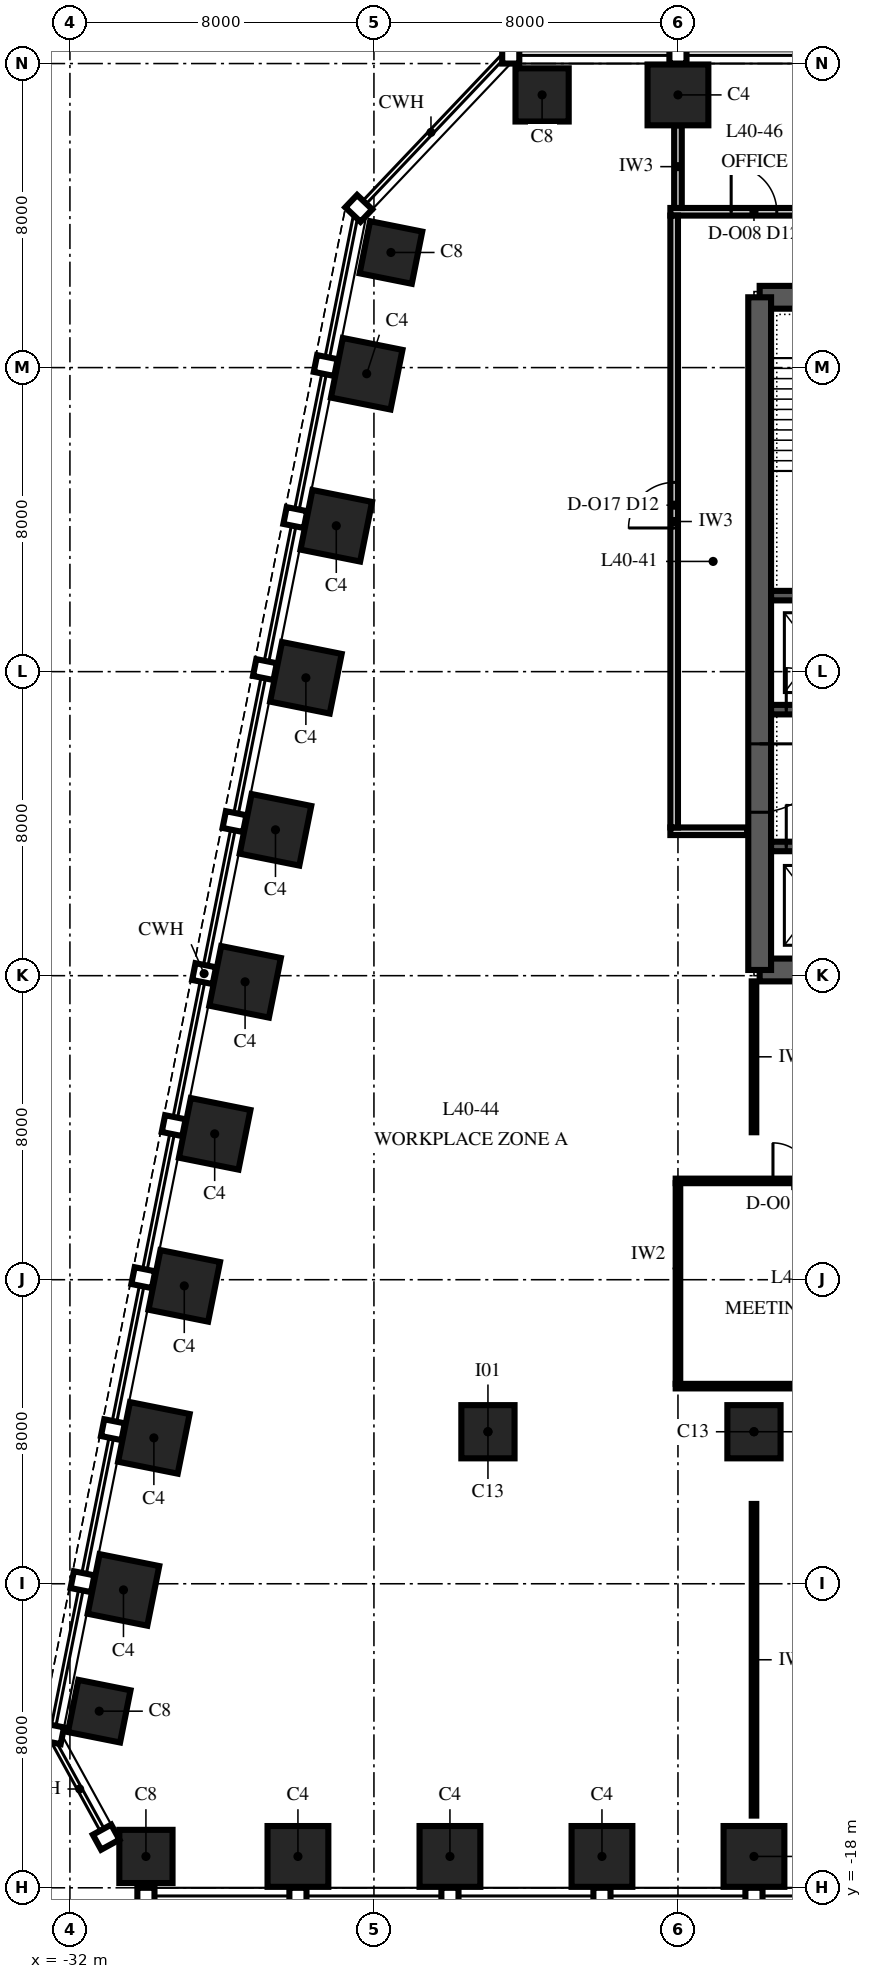
"""IFC4 building model, lengths in metres.
Left out: names, types, materials, properties, quantities, classifications, styles, units other than length and angle.
Written with IfcOpenShell. Run it as: python <this file> out.ifc"""

import sys

from ifc_helpers import new_model, si_unit, direction, frame, frame_2d, origin, origin_2d, place, context, subcontext, project, spatial, polyline, rectangle, outline, extrude, element, fill, save


model = new_model("IFC4")
c1 = context("Model", 3, precision=1e-05, world=origin(), true_north=direction((0.0, 1.0)))
c2 = subcontext(c1, "Body", "Model", "MODEL_VIEW")
j1 = project(units=[si_unit("LENGTHUNIT", "METRE"), si_unit("PLANEANGLEUNIT", "RADIAN")], contexts=[c1])
p1 = place(None, origin())
s1 = spatial("IfcSite", under=j1, at=p1, CompositionType="ELEMENT")
p2 = place(p1, origin())
s2 = spatial("IfcBuilding", under=s1, at=p2, CompositionType="ELEMENT")
p3 = place(p2, frame((0.0, 0.0, 178.0)))
s3 = spatial("IfcBuildingStorey", under=s2, at=p3, CompositionType="ELEMENT", Elevation=178.0)
p4 = place(p3, frame((-30.0, -17.175, 0.0), z_axis=(0.0, 0.0, 1.0), x_axis=(1.0, 0.0, 0.0)))
e1 = element("IfcColumn", 1, at=p4, inside=s3, PredefinedType="COLUMN", context=c2, shape_type="SweptSolid", body=[
    extrude(rectangle(XDim=1.4, YDim=1.4, at=origin_2d()), origin(), (0.0, 0.0, 1.0), 4.0),
])
for number, where, z_axis, x_axis in (
    (2, (-26.0, -17.175, 0.0), (0.0, 0.0, 1.0), (1.0, 0.0, 0.0)),
    (3, (-22.0, -17.175, 0.0), (0.0, 0.0, 1.0), (1.0, 0.0, 0.0)),
    (4, (-18.0, -17.175, 0.0), (0.0, 0.0, 1.0), (1.0, 0.0, 0.0)),
    (5, (-14.0, -17.175, 0.0), (0.0, 0.0, 1.0), (1.0, 0.0, 0.0)),
    (6, (-16.0, 29.175, 0.0), (0.0, 0.0, 1.0), (-1.0, 0.0, 0.0)),
):
    element("IfcColumn", number, at=place(p3, frame(where, z_axis=z_axis, x_axis=x_axis)), inside=s3, PredefinedType="COLUMN", context=c2, shape_type="SweptSolid", body=[
        extrude(rectangle(XDim=1.6, YDim=1.6, at=origin_2d()), origin(), (0.0, 0.0, 1.0), 4.0),
    ])
for number, where, z_axis, x_axis in (
    (7, (-19.575, 29.175, 0.0), (0.0, 0.0, 1.0), (-1.0, 0.0, 0.0)),
    (8, (-23.553, 25.029, 0.0), (0.0, 0.0, 1.0), (-0.196, -0.981, 0.0)),
):
    element("IfcColumn", number, at=place(p3, frame(where, z_axis=z_axis, x_axis=x_axis)), inside=s3, PredefinedType="COLUMN", context=c2, shape_type="SweptSolid", body=[
        extrude(rectangle(XDim=1.4, YDim=1.4, at=origin_2d()), origin(), (0.0, 0.0, 1.0), 4.0),
    ])
for number, where, z_axis, x_axis in (
    (9, (-24.191, 21.838, 0.0), (0.0, 0.0, 1.0), (-0.196, -0.981, 0.0)),
    (10, (-24.991, 17.838, 0.0), (0.0, 0.0, 1.0), (-0.196, -0.981, 0.0)),
    (11, (-25.791, 13.838, 0.0), (0.0, 0.0, 1.0), (-0.196, -0.981, 0.0)),
    (12, (-26.591, 9.838, 0.0), (0.0, 0.0, 1.0), (-0.196, -0.981, 0.0)),
    (13, (-27.391, 5.838, 0.0), (0.0, 0.0, 1.0), (-0.196, -0.981, 0.0)),
    (14, (-28.191, 1.838, 0.0), (0.0, 0.0, 1.0), (-0.196, -0.981, 0.0)),
    (15, (-28.991, -2.162, 0.0), (0.0, 0.0, 1.0), (-0.196, -0.981, 0.0)),
    (16, (-29.791, -6.162, 0.0), (0.0, 0.0, 1.0), (-0.196, -0.981, 0.0)),
    (17, (-30.591, -10.162, 0.0), (0.0, 0.0, 1.0), (-0.196, -0.981, 0.0)),
):
    element("IfcColumn", number, at=place(p3, frame(where, z_axis=z_axis, x_axis=x_axis)), inside=s3, PredefinedType="COLUMN", context=c2, shape_type="SweptSolid", body=[
        extrude(rectangle(XDim=1.6, YDim=1.6, at=origin_2d()), origin(), (0.0, 0.0, 1.0), 4.0),
    ])
for number, where, z_axis, x_axis in (
    (18, (-31.229, -13.353, 0.0), (0.0, 0.0, 1.0), (-0.196, -0.981, 0.0)),
    (19, (-21.0, -6.0, 0.0), (0.0, 0.0, 1.0), (1.0, 0.0, 0.0)),
    (20, (-14.0, -6.0, 0.0), (0.0, 0.0, 1.0), (1.0, 0.0, 0.0)),
):
    element("IfcColumn", number, at=place(p3, frame(where, z_axis=z_axis, x_axis=x_axis)), inside=s3, PredefinedType="COLUMN", context=c2, shape_type="SweptSolid", body=[
        extrude(rectangle(XDim=1.4, YDim=1.4, at=origin_2d()), origin(), (0.0, 0.0, 1.0), 4.0),
    ])
p5 = place(p3, frame((-13.85, 6.15, 0.0), z_axis=(0.0, 0.0, 1.0), x_axis=(1.0, 0.0, 0.0)))
e21 = element("IfcWall", 21, at=p5, inside=s3, PredefinedType="SHEAR", context=c2, shape_type="SweptSolid", body=[
    extrude(rectangle(XDim=27.7, YDim=0.6, at=frame_2d((13.85, 0.0))), origin(), (0.0, 0.0, 1.0), 4.0),
])
p6 = place(p3, frame((13.85, 23.85, 0.0), z_axis=(0.0, 0.0, 1.0), x_axis=(-1.0, 0.0, 0.0)))
e22 = element("IfcWall", 22, at=p6, inside=s3, PredefinedType="SHEAR", context=c2, shape_type="SweptSolid", body=[
    extrude(rectangle(XDim=27.7, YDim=0.6, at=frame_2d((13.85, 0.0))), origin(), (0.0, 0.0, 1.0), 4.0),
])
p7 = place(p6, frame((21.75, 0.0, 0.0)))
e23 = element("IfcOpeningElement", 23, at=p7, cuts=e22, PredefinedType="OPENING", context=c2, shape_type="SweptSolid", body=[
    extrude(rectangle(XDim=1.0, YDim=2.1, at=frame_2d((0.5, 1.05))), frame((0.0, 0.315, 0.0), z_axis=(0.0, -1.0, 0.0), x_axis=(1.0, 0.0, 0.0)), (0.0, 0.0, 1.0), 0.63),
])
p8 = place(p6, frame((4.95, 0.0, 0.0)))
e24 = element("IfcOpeningElement", 24, at=p8, cuts=e22, PredefinedType="OPENING", context=c2, shape_type="SweptSolid", body=[
    extrude(rectangle(XDim=1.0, YDim=2.1, at=frame_2d((0.5, 1.05))), frame((0.0, 0.315, 0.0), z_axis=(0.0, -1.0, 0.0), x_axis=(1.0, 0.0, 0.0)), (0.0, 0.0, 1.0), 0.63),
])
p9 = place(p6, frame((17.35, 0.0, 0.0)))
e25 = element("IfcOpeningElement", 25, at=p9, cuts=e22, PredefinedType="OPENING", context=c2, shape_type="SweptSolid", body=[
    extrude(rectangle(XDim=1.0, YDim=2.1, at=frame_2d((0.5, 1.05))), frame((0.0, 0.315, 0.0), z_axis=(0.0, -1.0, 0.0), x_axis=(1.0, 0.0, 0.0)), (0.0, 0.0, 1.0), 0.63),
])
p10 = place(p6, frame((13.35, 0.0, 0.0)))
e26 = element("IfcOpeningElement", 26, at=p10, cuts=e22, PredefinedType="OPENING", context=c2, shape_type="SweptSolid", body=[
    extrude(rectangle(XDim=1.0, YDim=2.1, at=frame_2d((0.5, 1.05))), frame((0.0, 0.315, 0.0), z_axis=(0.0, -1.0, 0.0), x_axis=(1.0, 0.0, 0.0)), (0.0, 0.0, 1.0), 0.63),
])
p11 = place(p6, frame((9.35, 0.0, 0.0)))
e27 = element("IfcOpeningElement", 27, at=p11, cuts=e22, PredefinedType="OPENING", context=c2, shape_type="SweptSolid", body=[
    extrude(rectangle(XDim=1.0, YDim=2.1, at=frame_2d((0.5, 1.05))), frame((0.0, 0.315, 0.0), z_axis=(0.0, -1.0, 0.0), x_axis=(1.0, 0.0, 0.0)), (0.0, 0.0, 1.0), 0.63),
])
p12 = place(p3, frame((-13.85, 23.85, 0.0), z_axis=(0.0, 0.0, 1.0), x_axis=(0.0, -1.0, 0.0)))
e28 = element("IfcWall", 28, at=p12, inside=s3, PredefinedType="SHEAR", context=c2, shape_type="SweptSolid", body=[
    extrude(outline(polyline([(0.0, -0.3), (17.7, -0.3), (17.7, 0.0), (17.4, 0.0), (17.4, 0.3), (0.3, 0.3), (0.3, 0.0), (0.0, 0.0), (0.0, -0.3)])), origin(), (0.0, 0.0, 1.0), 4.0),
])
p13 = place(p12, frame((11.75, 0.0, 0.0)))
e29 = element("IfcOpeningElement", 29, at=p13, cuts=e28, PredefinedType="OPENING", context=c2, shape_type="SweptSolid", body=[
    extrude(rectangle(XDim=1.8, YDim=2.4, at=frame_2d((0.9, 1.2))), frame((0.0, 0.315, 0.0), z_axis=(0.0, -1.0, 0.0), x_axis=(1.0, 0.0, 0.0)), (0.0, 0.0, 1.0), 0.63),
])
p14 = place(p3, frame((-13.55, 9.4, 0.0), z_axis=(0.0, 0.0, 1.0), x_axis=(1.0, 0.0, 0.0)))
e30 = element("IfcWall", 30, at=p14, inside=s3, PredefinedType="SHEAR", context=c2, shape_type="SweptSolid", body=[
    extrude(rectangle(XDim=27.1, YDim=0.25, at=frame_2d((13.55, 0.0))), origin(), (0.0, 0.0, 1.0), 4.0),
])
p15 = place(p14, frame((0.4, 0.0, 0.0)))
e31 = element("IfcOpeningElement", 31, at=p15, cuts=e30, PredefinedType="OPENING", context=c2, shape_type="SweptSolid", body=[
    extrude(rectangle(XDim=1.1, YDim=2.1, at=frame_2d((0.55, 1.05))), frame((0.0, 0.14, 0.0), z_axis=(0.0, -1.0, 0.0), x_axis=(1.0, 0.0, 0.0)), (0.0, 0.0, 1.0), 0.28),
])
p16 = place(p14, frame((3.2, 0.0, 0.0)))
e32 = element("IfcOpeningElement", 32, at=p16, cuts=e30, PredefinedType="OPENING", context=c2, shape_type="SweptSolid", body=[
    extrude(rectangle(XDim=1.1, YDim=2.1, at=frame_2d((0.55, 1.05))), frame((0.0, 0.14, 0.0), z_axis=(0.0, -1.0, 0.0), x_axis=(1.0, 0.0, 0.0)), (0.0, 0.0, 1.0), 0.28),
])
p17 = place(p14, frame((6.0, 0.0, 0.0)))
e33 = element("IfcOpeningElement", 33, at=p17, cuts=e30, PredefinedType="OPENING", context=c2, shape_type="SweptSolid", body=[
    extrude(rectangle(XDim=1.1, YDim=2.1, at=frame_2d((0.55, 1.05))), frame((0.0, 0.14, 0.0), z_axis=(0.0, -1.0, 0.0), x_axis=(1.0, 0.0, 0.0)), (0.0, 0.0, 1.0), 0.28),
])
p18 = place(p3, frame((-13.55, 13.0, 0.0), z_axis=(0.0, 0.0, 1.0), x_axis=(1.0, 0.0, 0.0)))
e34 = element("IfcWall", 34, at=p18, inside=s3, PredefinedType="SHEAR", context=c2, shape_type="SweptSolid", body=[
    extrude(rectangle(XDim=27.1, YDim=0.25, at=frame_2d((13.55, 0.0))), origin(), (0.0, 0.0, 1.0), 4.0),
])
p19 = place(p18, frame((0.4, 0.0, 0.0)))
e35 = element("IfcOpeningElement", 35, at=p19, cuts=e34, PredefinedType="OPENING", context=c2, shape_type="SweptSolid", body=[
    extrude(rectangle(XDim=1.1, YDim=2.1, at=frame_2d((0.55, 1.05))), frame((0.0, 0.14, 0.0), z_axis=(0.0, -1.0, 0.0), x_axis=(1.0, 0.0, 0.0)), (0.0, 0.0, 1.0), 0.28),
])
p20 = place(p18, frame((3.2, 0.0, 0.0)))
e36 = element("IfcOpeningElement", 36, at=p20, cuts=e34, PredefinedType="OPENING", context=c2, shape_type="SweptSolid", body=[
    extrude(rectangle(XDim=1.1, YDim=2.1, at=frame_2d((0.55, 1.05))), frame((0.0, 0.14, 0.0), z_axis=(0.0, -1.0, 0.0), x_axis=(1.0, 0.0, 0.0)), (0.0, 0.0, 1.0), 0.28),
])
p21 = place(p18, frame((6.0, 0.0, 0.0)))
e37 = element("IfcOpeningElement", 37, at=p21, cuts=e34, PredefinedType="OPENING", context=c2, shape_type="SweptSolid", body=[
    extrude(rectangle(XDim=1.1, YDim=2.1, at=frame_2d((0.55, 1.05))), frame((0.0, 0.14, 0.0), z_axis=(0.0, -1.0, 0.0), x_axis=(1.0, 0.0, 0.0)), (0.0, 0.0, 1.0), 0.28),
])
p22 = place(p18, frame((15.5, 0.0, 0.0)))
e38 = element("IfcOpeningElement", 38, at=p22, cuts=e34, PredefinedType="OPENING", context=c2, shape_type="SweptSolid", body=[
    extrude(rectangle(XDim=0.9, YDim=2.1, at=frame_2d((0.45, 1.05))), frame((0.0, 0.14, 0.0), z_axis=(0.0, -1.0, 0.0), x_axis=(1.0, 0.0, 0.0)), (0.0, 0.0, 1.0), 0.28),
])
p23 = place(p18, frame((17.9, 0.0, 0.0)))
e39 = element("IfcOpeningElement", 39, at=p23, cuts=e34, PredefinedType="OPENING", context=c2, shape_type="SweptSolid", body=[
    extrude(rectangle(XDim=0.9, YDim=2.1, at=frame_2d((0.45, 1.05))), frame((0.0, 0.14, 0.0), z_axis=(0.0, -1.0, 0.0), x_axis=(1.0, 0.0, 0.0)), (0.0, 0.0, 1.0), 0.28),
])
p24 = place(p3, frame((-13.55, 16.0, 0.0), z_axis=(0.0, 0.0, 1.0), x_axis=(1.0, 0.0, 0.0)))
e40 = element("IfcWall", 40, at=p24, inside=s3, PredefinedType="SHEAR", context=c2, shape_type="SweptSolid", body=[
    extrude(rectangle(XDim=27.1, YDim=0.25, at=frame_2d((13.55, 0.0))), origin(), (0.0, 0.0, 1.0), 4.0),
])
p25 = place(p3, frame((-16.06, -4.8, 0.0), z_axis=(0.0, 0.0, 1.0), x_axis=(1.0, 0.0, 0.0)))
e41 = element("IfcWall", 41, at=p25, inside=s3, PredefinedType="PARTITIONING", context=c2, shape_type="SweptSolid", body=[
    extrude(rectangle(XDim=32.12, YDim=0.12, at=frame_2d((16.06, 0.0))), origin(), (0.0, 0.0, 1.0), 3.25),
])
p26 = place(p3, frame((-16.06, 0.6, 0.0), z_axis=(0.0, 0.0, 1.0), x_axis=(1.0, 0.0, 0.0)))
e42 = element("IfcWall", 42, at=p26, inside=s3, PredefinedType="PARTITIONING", context=c2, shape_type="SweptSolid", body=[
    extrude(rectangle(XDim=12.12, YDim=0.12, at=frame_2d((6.06, 0.0))), origin(), (0.0, 0.0, 1.0), 3.25),
])
p27 = place(p26, frame((2.56, 0.0, 0.0)))
e43 = element("IfcOpeningElement", 43, at=p27, cuts=e42, PredefinedType="OPENING", context=c2, shape_type="SweptSolid", body=[
    extrude(rectangle(XDim=1.0, YDim=2.4, at=frame_2d((0.5, 1.2))), frame((0.0, 0.075, 0.0), z_axis=(0.0, -1.0, 0.0), x_axis=(1.0, 0.0, 0.0)), (0.0, 0.0, 1.0), 0.15),
])
p28 = place(p26, frame((8.56, 0.0, 0.0)))
e44 = element("IfcOpeningElement", 44, at=p28, cuts=e42, PredefinedType="OPENING", context=c2, shape_type="SweptSolid", body=[
    extrude(rectangle(XDim=1.0, YDim=2.4, at=frame_2d((0.5, 1.2))), frame((0.0, 0.075, 0.0), z_axis=(0.0, -1.0, 0.0), x_axis=(1.0, 0.0, 0.0)), (0.0, 0.0, 1.0), 0.15),
])
p29 = place(p3, frame((-16.2, 9.8, 0.0), z_axis=(0.0, 0.0, 1.0), x_axis=(1.0, 0.0, 0.0)))
e45 = element("IfcWall", 45, at=p29, inside=s3, PredefinedType="PARTITIONING", context=c2, shape_type="SweptSolid", body=[
    extrude(rectangle(XDim=2.02, YDim=0.2, at=frame_2d((1.01, 0.0))), origin(), (0.0, 0.0, 1.0), 3.85),
])
p30 = place(p3, frame((-16.2, 26.1, 0.0), z_axis=(0.0, 0.0, 1.0), x_axis=(1.0, 0.0, 0.0)))
e46 = element("IfcWall", 46, at=p30, inside=s3, PredefinedType="PARTITIONING", context=c2, shape_type="SweptSolid", body=[
    extrude(rectangle(XDim=32.1, YDim=0.2, at=frame_2d((16.05, 0.0))), origin(), (0.0, 0.0, 1.0), 3.4),
])
p31 = place(p30, frame((1.6, 0.0, 0.0)))
e47 = element("IfcOpeningElement", 47, at=p31, cuts=e46, PredefinedType="OPENING", context=c2, shape_type="SweptSolid", body=[
    extrude(rectangle(XDim=1.2, YDim=2.4, at=frame_2d((0.6, 1.2))), frame((0.0, 0.115, 0.0), z_axis=(0.0, -1.0, 0.0), x_axis=(1.0, 0.0, 0.0)), (0.0, 0.0, 1.0), 0.23),
])
p32 = place(p30, frame((5.6, 0.0, 0.0)))
e48 = element("IfcOpeningElement", 48, at=p32, cuts=e46, PredefinedType="OPENING", context=c2, shape_type="SweptSolid", body=[
    extrude(rectangle(XDim=1.2, YDim=2.4, at=frame_2d((0.6, 1.2))), frame((0.0, 0.115, 0.0), z_axis=(0.0, -1.0, 0.0), x_axis=(1.0, 0.0, 0.0)), (0.0, 0.0, 1.0), 0.23),
])
p33 = place(p30, frame((9.6, 0.0, 0.0)))
e49 = element("IfcOpeningElement", 49, at=p33, cuts=e46, PredefinedType="OPENING", context=c2, shape_type="SweptSolid", body=[
    extrude(rectangle(XDim=1.2, YDim=2.4, at=frame_2d((0.6, 1.2))), frame((0.0, 0.115, 0.0), z_axis=(0.0, -1.0, 0.0), x_axis=(1.0, 0.0, 0.0)), (0.0, 0.0, 1.0), 0.23),
])
p34 = place(p30, frame((13.6, 0.0, 0.0)))
e50 = element("IfcOpeningElement", 50, at=p34, cuts=e46, PredefinedType="OPENING", context=c2, shape_type="SweptSolid", body=[
    extrude(rectangle(XDim=1.2, YDim=2.4, at=frame_2d((0.6, 1.2))), frame((0.0, 0.115, 0.0), z_axis=(0.0, -1.0, 0.0), x_axis=(1.0, 0.0, 0.0)), (0.0, 0.0, 1.0), 0.23),
])
p35 = place(p30, frame((17.6, 0.0, 0.0)))
e51 = element("IfcOpeningElement", 51, at=p35, cuts=e46, PredefinedType="OPENING", context=c2, shape_type="SweptSolid", body=[
    extrude(rectangle(XDim=1.2, YDim=2.4, at=frame_2d((0.6, 1.2))), frame((0.0, 0.115, 0.0), z_axis=(0.0, -1.0, 0.0), x_axis=(1.0, 0.0, 0.0)), (0.0, 0.0, 1.0), 0.23),
])
p36 = place(p30, frame((21.6, 0.0, 0.0)))
e52 = element("IfcOpeningElement", 52, at=p36, cuts=e46, PredefinedType="OPENING", context=c2, shape_type="SweptSolid", body=[
    extrude(rectangle(XDim=1.2, YDim=2.4, at=frame_2d((0.6, 1.2))), frame((0.0, 0.115, 0.0), z_axis=(0.0, -1.0, 0.0), x_axis=(1.0, 0.0, 0.0)), (0.0, 0.0, 1.0), 0.23),
])
p37 = place(p30, frame((25.6, 0.0, 0.0)))
e53 = element("IfcOpeningElement", 53, at=p37, cuts=e46, PredefinedType="OPENING", context=c2, shape_type="SweptSolid", body=[
    extrude(rectangle(XDim=1.2, YDim=2.4, at=frame_2d((0.6, 1.2))), frame((0.0, 0.115, 0.0), z_axis=(0.0, -1.0, 0.0), x_axis=(1.0, 0.0, 0.0)), (0.0, 0.0, 1.0), 0.23),
])
p38 = place(p30, frame((29.6, 0.0, 0.0)))
e54 = element("IfcOpeningElement", 54, at=p38, cuts=e46, PredefinedType="OPENING", context=c2, shape_type="SweptSolid", body=[
    extrude(rectangle(XDim=1.2, YDim=2.4, at=frame_2d((0.6, 1.2))), frame((0.0, 0.115, 0.0), z_axis=(0.0, -1.0, 0.0), x_axis=(1.0, 0.0, 0.0)), (0.0, 0.0, 1.0), 0.23),
])
p39 = place(p3, frame((-16.1, 9.9, 0.0), z_axis=(0.0, 0.0, 1.0), x_axis=(0.0, 1.0, 0.0)))
e55 = element("IfcWall", 55, at=p39, inside=s3, PredefinedType="PARTITIONING", context=c2, shape_type="SweptSolid", body=[
    extrude(rectangle(XDim=16.1, YDim=0.2, at=frame_2d((8.05, 0.0))), origin(), (0.0, 0.0, 1.0), 3.25),
])
p40 = place(p39, frame((7.88, 0.0, 0.0)))
e56 = element("IfcOpeningElement", 56, at=p40, cuts=e55, PredefinedType="OPENING", context=c2, shape_type="SweptSolid", body=[
    extrude(rectangle(XDim=1.2, YDim=2.4, at=frame_2d((0.6, 1.2))), frame((0.0, 0.115, 0.0), z_axis=(0.0, -1.0, 0.0), x_axis=(1.0, 0.0, 0.0)), (0.0, 0.0, 1.0), 0.23),
])
p41 = place(p3, frame((-16.0, -4.74, 0.0), z_axis=(0.0, 0.0, 1.0), x_axis=(0.0, 1.0, 0.0)))
e57 = element("IfcWall", 57, at=p41, inside=s3, PredefinedType="PARTITIONING", context=c2, shape_type="SweptSolid", body=[
    extrude(rectangle(XDim=5.28, YDim=0.12, at=frame_2d((2.64, 0.0))), origin(), (0.0, 0.0, 1.0), 3.85),
])
p42 = place(p3, frame((-16.0, 26.2, 0.0), z_axis=(0.0, 0.0, 1.0), x_axis=(0.0, 1.0, 0.0)))
e58 = element("IfcWall", 58, at=p42, inside=s3, PredefinedType="PARTITIONING", context=c2, shape_type="SweptSolid", body=[
    extrude(rectangle(XDim=2.175, YDim=0.2, at=frame_2d((1.087, 0.0))), origin(), (0.0, 0.0, 1.0), 3.4),
])
p43 = place(p3, frame((-13.999, -16.1, 0.0), z_axis=(0.0, 0.0, 1.0), x_axis=(0.0, 1.0, 0.0)))
e59 = element("IfcWall", 59, at=p43, inside=s3, PredefinedType="PARTITIONING", context=c2, shape_type="SweptSolid", body=[
    extrude(rectangle(XDim=8.2, YDim=0.12, at=frame_2d((4.1, 0.0))), origin(), (0.0, 0.0, 1.0), 3.25),
])
p44 = place(p3, frame((-13.999, 1.88, 0.0), z_axis=(0.0, 0.0, 1.0), x_axis=(0.0, 1.0, 0.0)))
e60 = element("IfcWall", 60, at=p44, inside=s3, PredefinedType="PARTITIONING", context=c2, shape_type="SweptSolid", body=[
    extrude(rectangle(XDim=3.97, YDim=0.12, at=frame_2d((1.985, 0.0))), origin(), (0.0, 0.0, 1.0), 3.25),
])
p45 = place(p13, origin())
e61 = element("IfcDoor", 61, at=p45, inside=s3, OperationType="DOUBLE_DOOR_SINGLE_SWING", PredefinedType="DOOR", context=c2, shape_type="SweptSolid", body=[
    extrude(rectangle(XDim=1.8, YDim=2.4, at=frame_2d((0.9, 1.2))), frame((0.0, 0.3, 0.0), z_axis=(0.0, -1.0, 0.0), x_axis=(1.0, 0.0, 0.0)), (0.0, 0.0, 1.0), 0.6),
])
fill(e29, e61)
p46 = place(p15, origin())
e62 = element("IfcDoor", 62, at=p46, inside=s3, OperationType="SLIDING_TO_LEFT", PredefinedType="DOOR", context=c2, shape_type="SweptSolid", body=[
    extrude(rectangle(XDim=1.1, YDim=2.1, at=frame_2d((0.55, 1.05))), frame((0.0, 0.125, 0.0), z_axis=(0.0, -1.0, 0.0), x_axis=(1.0, 0.0, 0.0)), (0.0, 0.0, 1.0), 0.25),
])
fill(e31, e62)
p47 = place(p19, origin())
e63 = element("IfcDoor", 63, at=p47, inside=s3, OperationType="SLIDING_TO_LEFT", PredefinedType="DOOR", context=c2, shape_type="SweptSolid", body=[
    extrude(rectangle(XDim=1.1, YDim=2.1, at=frame_2d((0.55, 1.05))), frame((0.0, 0.125, 0.0), z_axis=(0.0, -1.0, 0.0), x_axis=(1.0, 0.0, 0.0)), (0.0, 0.0, 1.0), 0.25),
])
fill(e35, e63)
p48 = place(p27, origin())
e64 = element("IfcDoor", 64, at=p48, inside=s3, OperationType="SINGLE_SWING_RIGHT", PredefinedType="DOOR", context=c2, shape_type="SweptSolid", body=[
    extrude(rectangle(XDim=1.0, YDim=2.4, at=frame_2d((0.5, 1.2))), frame((0.0, 0.06, 0.0), z_axis=(0.0, -1.0, 0.0), x_axis=(1.0, 0.0, 0.0)), (0.0, 0.0, 1.0), 0.12),
])
fill(e43, e64)
p49 = place(p31, origin())
e65 = element("IfcDoor", 65, at=p49, inside=s3, OperationType="SINGLE_SWING_LEFT", PredefinedType="DOOR", context=c2, shape_type="SweptSolid", body=[
    extrude(rectangle(XDim=1.2, YDim=2.4, at=frame_2d((0.6, 1.2))), frame((0.0, 0.1, 0.0), z_axis=(0.0, -1.0, 0.0), x_axis=(1.0, 0.0, 0.0)), (0.0, 0.0, 1.0), 0.199),
])
fill(e47, e65)
p50 = place(p40, origin())
e66 = element("IfcDoor", 66, at=p50, inside=s3, OperationType="SINGLE_SWING_LEFT", PredefinedType="DOOR", context=c2, shape_type="SweptSolid", body=[
    extrude(rectangle(XDim=1.2, YDim=2.4, at=frame_2d((0.6, 1.2))), frame((0.0, 0.1, 0.0), z_axis=(0.0, -1.0, 0.0), x_axis=(1.0, 0.0, 0.0)), (0.0, 0.0, 1.0), 0.199),
])
fill(e56, e66)
save(model, sys.argv[1])
